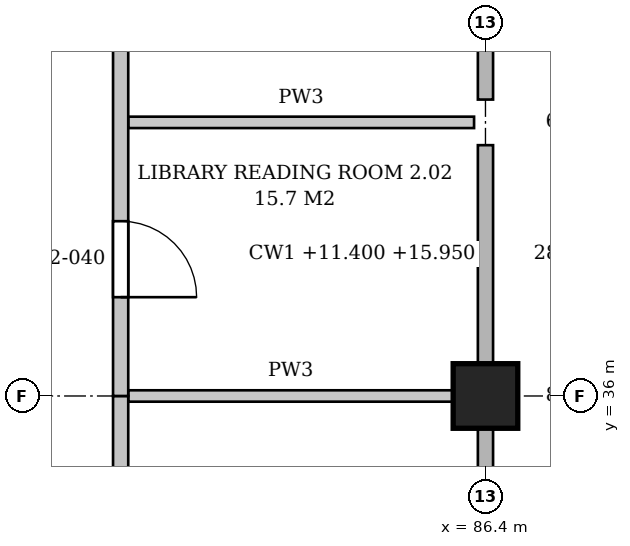
"""IFC4 building model, lengths in metres.
Left out: names, types, materials, properties, quantities, classifications, styles, units other than length and angle.
Written with IfcOpenShell. Run it as: python <this file> out.ifc"""

import sys

from ifc_helpers import new_model, si_unit, direction, frame, frame_2d, origin, origin_2d, place, context, subcontext, project, spatial, polyline, rectangle, outline, extrude, element, fill, save


model = new_model("IFC4")
c1 = context("Model", 3, precision=1e-05, world=origin(), true_north=direction((0.0, 1.0)))
c2 = subcontext(c1, "Body", "Model", "MODEL_VIEW")
j1 = project(units=[si_unit("LENGTHUNIT", "METRE"), si_unit("PLANEANGLEUNIT", "RADIAN")], contexts=[c1])
p1 = place(None, origin())
s1 = spatial("IfcSite", under=j1, at=p1, CompositionType="ELEMENT")
p2 = place(p1, origin())
s2 = spatial("IfcBuilding", under=s1, at=p2, CompositionType="ELEMENT")
p3 = place(p2, frame((0.0, 0.0, 11.4)))
s3 = spatial("IfcBuildingStorey", under=s2, at=p3, CompositionType="ELEMENT", Elevation=11.4)
p4 = place(p3, frame((86.4, 36.0, 0.0), z_axis=(0.0, 0.0, 1.0), x_axis=(1.0, 0.0, 0.0)))
e1 = element("IfcColumn", 1, at=p4, inside=s3, PredefinedType="COLUMN", context=c2, shape_type="SweptSolid", body=[
    extrude(rectangle(XDim=0.85, YDim=0.85, at=origin_2d()), origin(), (0.0, 0.0, 1.0), 5.4),
])
p5 = place(p3, frame((81.7, 36.0, 0.0), z_axis=(0.0, 0.0, 1.0), x_axis=(1.0, 0.0, 0.0)))
e2 = element("IfcWall", 2, at=p5, inside=s3, PredefinedType="PARTITIONING", context=c2, shape_type="SweptSolid", body=[
    extrude(rectangle(XDim=4.275, YDim=0.15, at=frame_2d((2.138, 0.0))), origin(), (0.0, 0.0, 1.0), 4.4),
])
p6 = place(p3, frame((81.7, 39.6, 0.0), z_axis=(0.0, 0.0, 1.0), x_axis=(1.0, 0.0, 0.0)))
e3 = element("IfcWall", 3, at=p6, inside=s3, PredefinedType="PARTITIONING", context=c2, shape_type="SweptSolid", body=[
    extrude(rectangle(XDim=4.55, YDim=0.15, at=frame_2d((2.275, 0.0))), origin(), (0.0, 0.0, 1.0), 4.4),
])
p7 = place(p3, frame((81.6, 28.8, 0.0), z_axis=(0.0, 0.0, 1.0), x_axis=(0.0, 1.0, 0.0)))
e4 = element("IfcWall", 4, at=p7, inside=s3, PredefinedType="PARTITIONING", context=c2, shape_type="SweptSolid", body=[
    extrude(outline(polyline([(0.0, 0.0), (7.2, 0.0), (7.2, 4.4), (6.95, 4.4), (6.95, 5.15), (0.25, 5.15), (0.25, 4.4), (0.0, 4.4), (0.0, 0.0)])), frame((0.0, 0.1, 0.0), z_axis=(0.0, -1.0, 0.0), x_axis=(1.0, 0.0, 0.0)), (0.0, 0.0, 1.0), 0.2),
])
p8 = place(p7, frame((3.1, 0.0, 0.0)))
e5 = element("IfcOpeningElement", 5, at=p8, cuts=e4, PredefinedType="OPENING", context=c2, shape_type="SweptSolid", body=[
    extrude(rectangle(XDim=1.0, YDim=2.1, at=frame_2d((0.5, 1.05))), frame((0.0, 0.11, 0.0), z_axis=(0.0, -1.0, 0.0), x_axis=(1.0, 0.0, 0.0)), (0.0, 0.0, 1.0), 0.22),
])
p9 = place(p3, frame((81.6, 36.0, 0.0), z_axis=(0.0, 0.0, 1.0), x_axis=(0.0, 1.0, 0.0)))
e6 = element("IfcWall", 6, at=p9, inside=s3, PredefinedType="PARTITIONING", context=c2, shape_type="SweptSolid", body=[
    extrude(outline(polyline([(0.0, 0.0), (7.2, 0.0), (7.2, 4.4), (6.95, 4.4), (6.95, 5.15), (0.25, 5.15), (0.25, 4.4), (0.0, 4.4), (0.0, 0.0)])), frame((0.0, 0.1, 0.0), z_axis=(0.0, -1.0, 0.0), x_axis=(1.0, 0.0, 0.0)), (0.0, 0.0, 1.0), 0.2),
])
p10 = place(p9, frame((1.3, 0.0, 0.0)))
e7 = element("IfcOpeningElement", 7, at=p10, cuts=e6, PredefinedType="OPENING", context=c2, shape_type="SweptSolid", body=[
    extrude(rectangle(XDim=1.0, YDim=2.1, at=frame_2d((0.5, 1.05))), frame((0.0, 0.11, 0.0), z_axis=(0.0, -1.0, 0.0), x_axis=(1.0, 0.0, 0.0)), (0.0, 0.0, 1.0), 0.22),
])
p11 = place(p9, frame((4.9, 0.0, 0.0)))
e8 = element("IfcOpeningElement", 8, at=p11, cuts=e6, PredefinedType="OPENING", context=c2, shape_type="SweptSolid", body=[
    extrude(rectangle(XDim=1.0, YDim=2.1, at=frame_2d((0.5, 1.05))), frame((0.0, 0.11, 0.0), z_axis=(0.0, -1.0, 0.0), x_axis=(1.0, 0.0, 0.0)), (0.0, 0.0, 1.0), 0.22),
])
p12 = place(p10, frame((1.0, 0.0, 0.0), z_axis=(0.0, 0.0, 1.0), x_axis=(-1.0, 0.0, 0.0)))
e9 = element("IfcDoor", 9, at=p12, inside=s3, OperationType="SINGLE_SWING_RIGHT", PredefinedType="DOOR", context=c2, shape_type="SweptSolid", body=[
    extrude(rectangle(XDim=1.0, YDim=2.1, at=frame_2d((0.5, 1.05))), frame((0.0, 0.025, 0.0), z_axis=(0.0, -1.0, 0.0), x_axis=(1.0, 0.0, 0.0)), (0.0, 0.0, 1.0), 0.05),
])
fill(e7, e9)
save(model, sys.argv[1])
